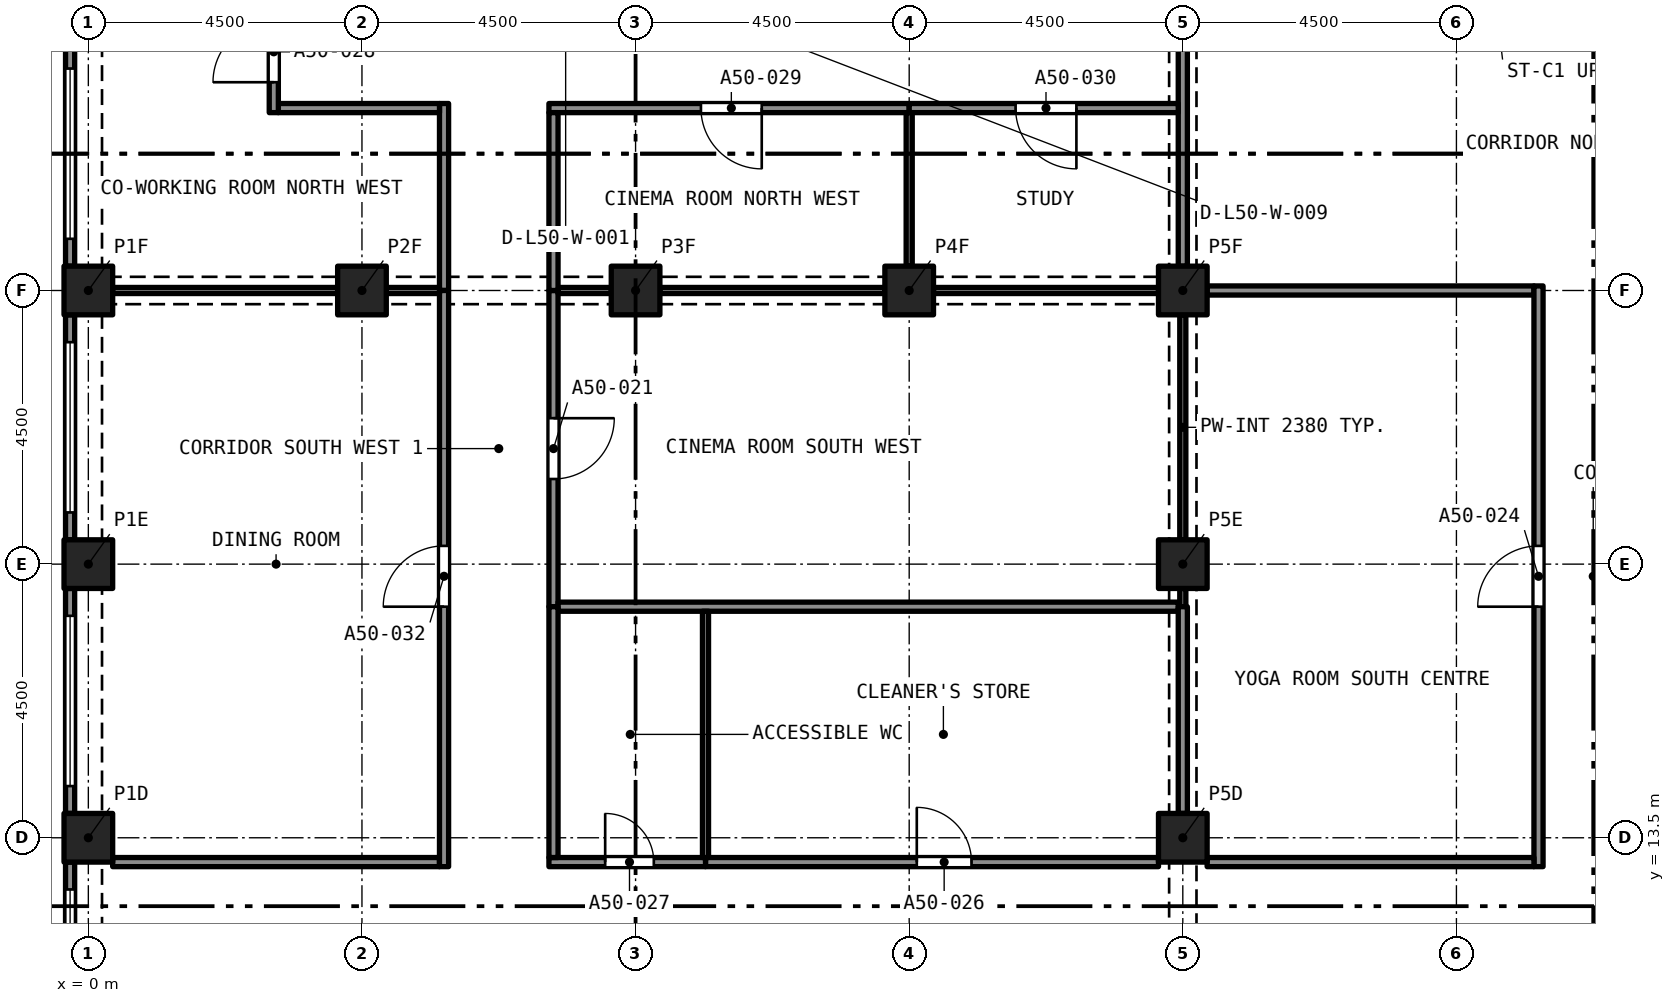
"""IFC4 building model, lengths in metres.
Left out: names, types, materials, properties, quantities, classifications, styles, units other than length and angle.
Written with IfcOpenShell. Run it as: python <this file> out.ifc"""

import sys

from ifc_helpers import new_model, si_unit, direction, frame, frame_2d, origin, origin_2d, place, context, subcontext, project, spatial, rectangle, extrude, element, fill, save


model = new_model("IFC4")
c1 = context("Model", 3, precision=1e-05, world=origin(), true_north=direction((0.0, 1.0)))
c2 = subcontext(c1, "Body", "Model", "MODEL_VIEW")
j1 = project(units=[si_unit("LENGTHUNIT", "METRE"), si_unit("PLANEANGLEUNIT", "RADIAN")], contexts=[c1])
p1 = place(None, origin())
s1 = spatial("IfcSite", under=j1, at=p1, CompositionType="ELEMENT")
p2 = place(p1, origin())
s2 = spatial("IfcBuilding", under=s1, at=p2, CompositionType="ELEMENT")
p3 = place(p2, frame((0.0, 0.0, 182.7)))
s3 = spatial("IfcBuildingStorey", under=s2, at=p3, CompositionType="ELEMENT", Elevation=182.7)
for number, where, z_axis, x_axis in (
    (1, (0.0, 13.5, 0.0), (0.0, 0.0, 1.0), (1.0, 0.0, 0.0)),
    (2, (18.0, 13.5, 0.0), (0.0, 0.0, 1.0), (1.0, 0.0, 0.0)),
    (3, (0.0, 18.0, 0.0), (0.0, 0.0, 1.0), (1.0, 0.0, 0.0)),
    (4, (18.0, 18.0, 0.0), (0.0, 0.0, 1.0), (1.0, 0.0, 0.0)),
    (5, (0.0, 22.5, 0.0), (0.0, 0.0, 1.0), (1.0, 0.0, 0.0)),
    (6, (4.5, 22.5, 0.0), (0.0, 0.0, 1.0), (1.0, 0.0, 0.0)),
    (7, (9.0, 22.5, 0.0), (0.0, 0.0, 1.0), (1.0, 0.0, 0.0)),
    (8, (13.5, 22.5, 0.0), (0.0, 0.0, 1.0), (1.0, 0.0, 0.0)),
    (9, (18.0, 22.5, 0.0), (0.0, 0.0, 1.0), (1.0, 0.0, 0.0)),
):
    element("IfcColumn", number, at=place(p3, frame(where, z_axis=z_axis, x_axis=x_axis)), inside=s3, PredefinedType="COLUMN", context=c2, shape_type="SweptSolid", body=[
        extrude(rectangle(XDim=0.8, YDim=0.8, at=origin_2d()), origin(), (0.0, 0.0, 1.0), 3.2),
    ])
p4 = place(p3, frame((-0.3, 22.9, 0.0), z_axis=(0.0, 0.0, 1.0), x_axis=(0.0, 1.0, 0.0)))
e10 = element("IfcWall", 10, at=p4, inside=s3, PredefinedType="SOLIDWALL", context=c2, shape_type="SweptSolid", body=[
    extrude(rectangle(XDim=3.7, YDim=0.15, at=frame_2d((1.85, 0.0))), origin(), (0.0, 0.0, 1.0), 3.2),
])
p5 = place(p4, frame((0.45, 0.0, 0.45)))
e11 = element("IfcOpeningElement", 11, at=p5, cuts=e10, PredefinedType="OPENING", context=c2, shape_type="SweptSolid", body=[
    extrude(rectangle(XDim=2.8, YDim=1.95, at=frame_2d((1.4, 0.975))), frame((0.0, 0.085, 0.0), z_axis=(0.0, -1.0, 0.0), x_axis=(1.0, 0.0, 0.0)), (0.0, 0.0, 1.0), 0.17),
])
p6 = place(p3, frame((-0.3, 18.4, 0.0), z_axis=(0.0, 0.0, 1.0), x_axis=(0.0, 1.0, 0.0)))
e12 = element("IfcWall", 12, at=p6, inside=s3, PredefinedType="SOLIDWALL", context=c2, shape_type="SweptSolid", body=[
    extrude(rectangle(XDim=3.7, YDim=0.15, at=frame_2d((1.85, 0.0))), origin(), (0.0, 0.0, 1.0), 3.2),
])
p7 = place(p6, frame((0.45, 0.0, 0.45)))
e13 = element("IfcOpeningElement", 13, at=p7, cuts=e12, PredefinedType="OPENING", context=c2, shape_type="SweptSolid", body=[
    extrude(rectangle(XDim=2.8, YDim=1.95, at=frame_2d((1.4, 0.975))), frame((0.0, 0.085, 0.0), z_axis=(0.0, -1.0, 0.0), x_axis=(1.0, 0.0, 0.0)), (0.0, 0.0, 1.0), 0.17),
])
p8 = place(p3, frame((-0.3, 13.9, 0.0), z_axis=(0.0, 0.0, 1.0), x_axis=(0.0, 1.0, 0.0)))
e14 = element("IfcWall", 14, at=p8, inside=s3, PredefinedType="SOLIDWALL", context=c2, shape_type="SweptSolid", body=[
    extrude(rectangle(XDim=3.7, YDim=0.15, at=frame_2d((1.85, 0.0))), origin(), (0.0, 0.0, 1.0), 3.2),
])
p9 = place(p8, frame((0.45, 0.0, 0.45)))
e15 = element("IfcOpeningElement", 15, at=p9, cuts=e14, PredefinedType="OPENING", context=c2, shape_type="SweptSolid", body=[
    extrude(rectangle(XDim=2.8, YDim=1.95, at=frame_2d((1.4, 0.975))), frame((0.0, 0.085, 0.0), z_axis=(0.0, -1.0, 0.0), x_axis=(1.0, 0.0, 0.0)), (0.0, 0.0, 1.0), 0.17),
])
p10 = place(p3, frame((-0.3, 9.4, 0.0), z_axis=(0.0, 0.0, 1.0), x_axis=(0.0, 1.0, 0.0)))
e16 = element("IfcWall", 16, at=p10, inside=s3, PredefinedType="SOLIDWALL", context=c2, shape_type="SweptSolid", body=[
    extrude(rectangle(XDim=3.7, YDim=0.15, at=frame_2d((1.85, 0.0))), origin(), (0.0, 0.0, 1.0), 3.2),
])
p11 = place(p10, frame((0.45, 0.0, 0.45)))
e17 = element("IfcOpeningElement", 17, at=p11, cuts=e16, PredefinedType="OPENING", context=c2, shape_type="SweptSolid", body=[
    extrude(rectangle(XDim=2.8, YDim=1.95, at=frame_2d((1.4, 0.975))), frame((0.0, 0.085, 0.0), z_axis=(0.0, -1.0, 0.0), x_axis=(1.0, 0.0, 0.0)), (0.0, 0.0, 1.0), 0.17),
])
p12 = place(p3, frame((18.0, 18.4, 0.0), z_axis=(0.0, 0.0, 1.0), x_axis=(0.0, 1.0, 0.0)))
e18 = element("IfcWall", 18, at=p12, inside=s3, PredefinedType="PARTITIONING", context=c2, shape_type="SweptSolid", body=[
    extrude(rectangle(XDim=3.7, YDim=0.1, at=frame_2d((1.85, 0.0))), origin(), (0.0, 0.0, 1.0), 2.38),
])
p13 = place(p3, frame((18.0, 17.3, 0.0), z_axis=(0.0, 0.0, 1.0), x_axis=(0.0, 1.0, 0.0)))
e19 = element("IfcWall", 19, at=p13, inside=s3, PredefinedType="PARTITIONING", context=c2, shape_type="SweptSolid", body=[
    extrude(rectangle(XDim=0.3, YDim=0.1, at=frame_2d((0.15, 0.0))), origin(), (0.0, 0.0, 1.0), 2.75),
])
p14 = place(p3, frame((7.65, 22.5, 0.0), z_axis=(0.0, 0.0, 1.0), x_axis=(0.0, -1.0, 0.0)))
e20 = element("IfcWall", 20, at=p14, inside=s3, PredefinedType="PARTITIONING", context=c2, shape_type="SweptSolid", body=[
    extrude(rectangle(XDim=5.2, YDim=0.15, at=frame_2d((2.6, 0.0))), origin(), (0.0, 0.0, 1.0), 2.9),
])
p15 = place(p14, frame((2.1, 0.0, 0.0)))
e21 = element("IfcOpeningElement", 21, at=p15, cuts=e20, PredefinedType="OPENING", context=c2, shape_type="SweptSolid", body=[
    extrude(rectangle(XDim=1.0, YDim=2.1, at=frame_2d((0.5, 1.05))), frame((0.0, 0.085, 0.0), z_axis=(0.0, -1.0, 0.0), x_axis=(1.0, 0.0, 0.0)), (0.0, 0.0, 1.0), 0.17),
])
p16 = place(p3, frame((7.725, 22.5, 0.0), z_axis=(0.0, 0.0, 1.0), x_axis=(1.0, 0.0, 0.0)))
e22 = element("IfcWall", 22, at=p16, inside=s3, PredefinedType="PARTITIONING", context=c2, shape_type="SweptSolid", body=[
    extrude(rectangle(XDim=0.875, YDim=0.1, at=frame_2d((0.438, 0.0))), origin(), (0.0, 0.0, 1.0), 2.38),
])
for number, where, z_axis, x_axis in (
    (23, (9.4, 22.5, 0.0), (0.0, 0.0, 1.0), (1.0, 0.0, 0.0)),
    (24, (13.9, 22.5, 0.0), (0.0, 0.0, 1.0), (1.0, 0.0, 0.0)),
):
    element("IfcWall", number, at=place(p3, frame(where, z_axis=z_axis, x_axis=x_axis)), inside=s3, PredefinedType="PARTITIONING", context=c2, shape_type="SweptSolid", body=[
        extrude(rectangle(XDim=3.7, YDim=0.1, at=frame_2d((1.85, 0.0))), origin(), (0.0, 0.0, 1.0), 2.38),
    ])
p17 = place(p3, frame((7.725, 17.3, 0.0), z_axis=(0.0, 0.0, 1.0), x_axis=(1.0, 0.0, 0.0)))
e25 = element("IfcWall", 25, at=p17, inside=s3, PredefinedType="PARTITIONING", context=c2, shape_type="SweptSolid", body=[
    extrude(rectangle(XDim=10.2, YDim=0.15, at=frame_2d((5.1, 0.0))), origin(), (0.0, 0.0, 1.0), 2.9),
])
p18 = place(p3, frame((18.4, 22.5, 0.0), z_axis=(0.0, 0.0, 1.0), x_axis=(1.0, 0.0, 0.0)))
e26 = element("IfcWall", 26, at=p18, inside=s3, PredefinedType="PARTITIONING", context=c2, shape_type="SweptSolid", body=[
    extrude(rectangle(XDim=5.375, YDim=0.15, at=frame_2d((2.688, 0.0))), origin(), (0.0, 0.0, 1.0), 2.75),
])
p19 = place(p3, frame((18.0, 22.9, 0.0), z_axis=(0.0, 0.0, 1.0), x_axis=(0.0, 1.0, 0.0)))
e27 = element("IfcWall", 27, at=p19, inside=s3, PredefinedType="PARTITIONING", context=c2, shape_type="SweptSolid", body=[
    extrude(rectangle(XDim=3.7, YDim=0.15, at=frame_2d((1.85, 0.0))), origin(), (0.0, 0.0, 1.0), 2.38),
])
p20 = place(p3, frame((23.85, 13.025, 0.0), z_axis=(0.0, 0.0, 1.0), x_axis=(0.0, 1.0, 0.0)))
e28 = element("IfcWall", 28, at=p20, inside=s3, PredefinedType="PARTITIONING", context=c2, shape_type="SweptSolid", body=[
    extrude(rectangle(XDim=9.55, YDim=0.15, at=frame_2d((4.775, 0.0))), origin(), (0.0, 0.0, 1.0), 2.75),
])
p21 = place(p20, frame((4.275, 0.0, 0.0)))
e29 = element("IfcOpeningElement", 29, at=p21, cuts=e28, PredefinedType="OPENING", context=c2, shape_type="SweptSolid", body=[
    extrude(rectangle(XDim=1.0, YDim=2.1, at=frame_2d((0.5, 1.05))), frame((0.0, 0.085, 0.0), z_axis=(0.0, -1.0, 0.0), x_axis=(1.0, 0.0, 0.0)), (0.0, 0.0, 1.0), 0.17),
])
p22 = place(p3, frame((18.4, 13.1, 0.0), z_axis=(0.0, 0.0, 1.0), x_axis=(1.0, 0.0, 0.0)))
e30 = element("IfcWall", 30, at=p22, inside=s3, PredefinedType="PARTITIONING", context=c2, shape_type="SweptSolid", body=[
    extrude(rectangle(XDim=5.375, YDim=0.15, at=frame_2d((2.688, 0.0))), origin(), (0.0, 0.0, 1.0), 2.75),
])
p23 = place(p3, frame((10.15, 13.1, 0.0), z_axis=(0.0, 0.0, 1.0), x_axis=(1.0, 0.0, 0.0)))
e31 = element("IfcWall", 31, at=p23, inside=s3, PredefinedType="PARTITIONING", context=c2, shape_type="SweptSolid", body=[
    extrude(rectangle(XDim=7.45, YDim=0.15, at=frame_2d((3.725, 0.0))), origin(), (0.0, 0.0, 1.0), 2.9),
])
p24 = place(p23, frame((3.475, 0.0, 0.0)))
e32 = element("IfcOpeningElement", 32, at=p24, cuts=e31, PredefinedType="OPENING", context=c2, shape_type="SweptSolid", body=[
    extrude(rectangle(XDim=0.9, YDim=2.1, at=frame_2d((0.45, 1.05))), frame((0.0, 0.085, 0.0), z_axis=(0.0, -1.0, 0.0), x_axis=(1.0, 0.0, 0.0)), (0.0, 0.0, 1.0), 0.17),
])
p25 = place(p3, frame((7.575, 13.1, 0.0), z_axis=(0.0, 0.0, 1.0), x_axis=(1.0, 0.0, 0.0)))
e33 = element("IfcWall", 33, at=p25, inside=s3, PredefinedType="PARTITIONING", context=c2, shape_type="SweptSolid", body=[
    extrude(rectangle(XDim=2.575, YDim=0.15, at=frame_2d((1.288, 0.0))), origin(), (0.0, 0.0, 1.0), 2.9),
])
p26 = place(p25, frame((0.925, 0.0, 0.0)))
e34 = element("IfcOpeningElement", 34, at=p26, cuts=e33, PredefinedType="OPENING", context=c2, shape_type="SweptSolid", body=[
    extrude(rectangle(XDim=0.8, YDim=2.1, at=frame_2d((0.4, 1.05))), frame((0.0, 0.085, 0.0), z_axis=(0.0, -1.0, 0.0), x_axis=(1.0, 0.0, 0.0)), (0.0, 0.0, 1.0), 0.17),
])
p27 = place(p3, frame((0.4, 13.1, 0.0), z_axis=(0.0, 0.0, 1.0), x_axis=(1.0, 0.0, 0.0)))
e35 = element("IfcWall", 35, at=p27, inside=s3, PredefinedType="PARTITIONING", context=c2, shape_type="SweptSolid", body=[
    extrude(rectangle(XDim=5.375, YDim=0.15, at=frame_2d((2.688, 0.0))), origin(), (0.0, 0.0, 1.0), 2.9),
])
p28 = place(p3, frame((18.0, 13.9, 0.0), z_axis=(0.0, 0.0, 1.0), x_axis=(0.0, 1.0, 0.0)))
e36 = element("IfcWall", 36, at=p28, inside=s3, PredefinedType="PARTITIONING", context=c2, shape_type="SweptSolid", body=[
    extrude(rectangle(XDim=3.4, YDim=0.15, at=frame_2d((1.7, 0.0))), origin(), (0.0, 0.0, 1.0), 2.38),
])
p29 = place(p3, frame((5.85, 22.5, 0.0), z_axis=(0.0, 0.0, 1.0), x_axis=(0.0, 1.0, 0.0)))
e37 = element("IfcWall", 37, at=p29, inside=s3, PredefinedType="PARTITIONING", context=c2, shape_type="SweptSolid", body=[
    extrude(rectangle(XDim=3.075, YDim=0.15, at=frame_2d((1.538, 0.0))), origin(), (0.0, 0.0, 1.0), 2.9),
])
p30 = place(p3, frame((3.125, 25.5, 0.0), z_axis=(0.0, 0.0, 1.0), x_axis=(1.0, 0.0, 0.0)))
e38 = element("IfcWall", 38, at=p30, inside=s3, PredefinedType="PARTITIONING", context=c2, shape_type="SweptSolid", body=[
    extrude(rectangle(XDim=2.65, YDim=0.15, at=frame_2d((1.325, 0.0))), origin(), (0.0, 0.0, 1.0), 2.9),
])
p31 = place(p3, frame((3.05, 25.425, 0.0), z_axis=(0.0, 0.0, 1.0), x_axis=(0.0, 1.0, 0.0)))
e39 = element("IfcWall", 39, at=p31, inside=s3, PredefinedType="PARTITIONING", context=c2, shape_type="SweptSolid", body=[
    extrude(rectangle(XDim=1.925, YDim=0.15, at=frame_2d((0.962, 0.0))), origin(), (0.0, 0.0, 1.0), 2.9),
])
p32 = place(p31, frame((0.5, 0.0, 0.0)))
e40 = element("IfcOpeningElement", 40, at=p32, cuts=e39, PredefinedType="OPENING", context=c2, shape_type="SweptSolid", body=[
    extrude(rectangle(XDim=1.0, YDim=2.1, at=frame_2d((0.5, 1.05))), frame((0.0, 0.085, 0.0), z_axis=(0.0, -1.0, 0.0), x_axis=(1.0, 0.0, 0.0)), (0.0, 0.0, 1.0), 0.17),
])
p33 = place(p3, frame((13.5, 25.5, 0.0), z_axis=(0.0, 0.0, 1.0), x_axis=(-1.0, 0.0, 0.0)))
e41 = element("IfcWall", 41, at=p33, inside=s3, PredefinedType="PARTITIONING", context=c2, shape_type="SweptSolid", body=[
    extrude(rectangle(XDim=5.925, YDim=0.15, at=frame_2d((2.962, 0.0))), origin(), (0.0, 0.0, 1.0), 2.9),
])
p34 = place(p33, frame((2.425, 0.0, 0.0)))
e42 = element("IfcOpeningElement", 42, at=p34, cuts=e41, PredefinedType="OPENING", context=c2, shape_type="SweptSolid", body=[
    extrude(rectangle(XDim=1.0, YDim=2.1, at=frame_2d((0.5, 1.05))), frame((0.0, 0.085, 0.0), z_axis=(0.0, -1.0, 0.0), x_axis=(1.0, 0.0, 0.0)), (0.0, 0.0, 1.0), 0.17),
])
p35 = place(p3, frame((7.65, 22.5, 0.0), z_axis=(0.0, 0.0, 1.0), x_axis=(0.0, 1.0, 0.0)))
e43 = element("IfcWall", 43, at=p35, inside=s3, PredefinedType="PARTITIONING", context=c2, shape_type="SweptSolid", body=[
    extrude(rectangle(XDim=2.925, YDim=0.15, at=frame_2d((1.462, 0.0))), origin(), (0.0, 0.0, 1.0), 2.9),
])
p36 = place(p3, frame((17.925, 25.5, 0.0), z_axis=(0.0, 0.0, 1.0), x_axis=(-1.0, 0.0, 0.0)))
e44 = element("IfcWall", 44, at=p36, inside=s3, PredefinedType="PARTITIONING", context=c2, shape_type="SweptSolid", body=[
    extrude(rectangle(XDim=4.425, YDim=0.15, at=frame_2d((2.212, 0.0))), origin(), (0.0, 0.0, 1.0), 2.9),
])
p37 = place(p36, frame((1.675, 0.0, 0.0)))
e45 = element("IfcOpeningElement", 45, at=p37, cuts=e44, PredefinedType="OPENING", context=c2, shape_type="SweptSolid", body=[
    extrude(rectangle(XDim=1.0, YDim=2.1, at=frame_2d((0.5, 1.05))), frame((0.0, 0.085, 0.0), z_axis=(0.0, -1.0, 0.0), x_axis=(1.0, 0.0, 0.0)), (0.0, 0.0, 1.0), 0.17),
])
p38 = place(p3, frame((7.65, 13.175, 0.0), z_axis=(0.0, 0.0, 1.0), x_axis=(0.0, 1.0, 0.0)))
e46 = element("IfcWall", 46, at=p38, inside=s3, PredefinedType="PARTITIONING", context=c2, shape_type="SweptSolid", body=[
    extrude(rectangle(XDim=4.125, YDim=0.15, at=frame_2d((2.062, 0.0))), origin(), (0.0, 0.0, 1.0), 2.9),
])
p39 = place(p3, frame((5.85, 13.025, 0.0), z_axis=(0.0, 0.0, 1.0), x_axis=(0.0, 1.0, 0.0)))
e47 = element("IfcWall", 47, at=p39, inside=s3, PredefinedType="PARTITIONING", context=c2, shape_type="SweptSolid", body=[
    extrude(rectangle(XDim=9.475, YDim=0.15, at=frame_2d((4.738, 0.0))), origin(), (0.0, 0.0, 1.0), 2.9),
])
p40 = place(p39, frame((4.275, 0.0, 0.0)))
e48 = element("IfcOpeningElement", 48, at=p40, cuts=e47, PredefinedType="OPENING", context=c2, shape_type="SweptSolid", body=[
    extrude(rectangle(XDim=1.0, YDim=2.1, at=frame_2d((0.5, 1.05))), frame((0.0, 0.085, 0.0), z_axis=(0.0, -1.0, 0.0), x_axis=(1.0, 0.0, 0.0)), (0.0, 0.0, 1.0), 0.17),
])
p41 = place(p3, frame((4.9, 22.5, 0.0), z_axis=(0.0, 0.0, 1.0), x_axis=(1.0, 0.0, 0.0)))
e49 = element("IfcWall", 49, at=p41, inside=s3, PredefinedType="PARTITIONING", context=c2, shape_type="SweptSolid", body=[
    extrude(rectangle(XDim=0.875, YDim=0.1, at=frame_2d((0.438, 0.0))), origin(), (0.0, 0.0, 1.0), 2.38),
])
p42 = place(p3, frame((0.4, 22.5, 0.0), z_axis=(0.0, 0.0, 1.0), x_axis=(1.0, 0.0, 0.0)))
e50 = element("IfcWall", 50, at=p42, inside=s3, PredefinedType="PARTITIONING", context=c2, shape_type="SweptSolid", body=[
    extrude(rectangle(XDim=3.7, YDim=0.1, at=frame_2d((1.85, 0.0))), origin(), (0.0, 0.0, 1.0), 2.38),
])
p43 = place(p3, frame((13.5, 22.9, 0.0), z_axis=(0.0, 0.0, 1.0), x_axis=(0.0, 1.0, 0.0)))
e51 = element("IfcWall", 51, at=p43, inside=s3, PredefinedType="PARTITIONING", context=c2, shape_type="SweptSolid", body=[
    extrude(rectangle(XDim=2.525, YDim=0.1, at=frame_2d((1.263, 0.0))), origin(), (0.0, 0.0, 1.0), 2.9),
])
p44 = place(p3, frame((10.15, 13.175, 0.0), z_axis=(0.0, 0.0, 1.0), x_axis=(0.0, 1.0, 0.0)))
e52 = element("IfcWall", 52, at=p44, inside=s3, PredefinedType="PARTITIONING", context=c2, shape_type="SweptSolid", body=[
    extrude(rectangle(XDim=4.05, YDim=0.1, at=frame_2d((2.025, 0.0))), origin(), (0.0, 0.0, 1.0), 2.9),
])
p45 = place(p5, origin())
e53 = element("IfcWindow", 53, at=p45, inside=s3, PartitioningType="SINGLE_PANEL", PredefinedType="WINDOW", context=c2, shape_type="SweptSolid", body=[
    extrude(rectangle(XDim=2.8, YDim=1.95, at=frame_2d((1.4, 0.975))), frame((0.0, 0.03, 0.0), z_axis=(0.0, -1.0, 0.0), x_axis=(1.0, 0.0, 0.0)), (0.0, 0.0, 1.0), 0.06),
])
fill(e11, e53)
p46 = place(p7, origin())
e54 = element("IfcWindow", 54, at=p46, inside=s3, PartitioningType="SINGLE_PANEL", PredefinedType="WINDOW", context=c2, shape_type="SweptSolid", body=[
    extrude(rectangle(XDim=2.8, YDim=1.95, at=frame_2d((1.4, 0.975))), frame((0.0, 0.03, 0.0), z_axis=(0.0, -1.0, 0.0), x_axis=(1.0, 0.0, 0.0)), (0.0, 0.0, 1.0), 0.06),
])
fill(e13, e54)
p47 = place(p9, origin())
e55 = element("IfcWindow", 55, at=p47, inside=s3, PartitioningType="SINGLE_PANEL", PredefinedType="WINDOW", context=c2, shape_type="SweptSolid", body=[
    extrude(rectangle(XDim=2.8, YDim=1.95, at=frame_2d((1.4, 0.975))), frame((0.0, 0.03, 0.0), z_axis=(0.0, -1.0, 0.0), x_axis=(1.0, 0.0, 0.0)), (0.0, 0.0, 1.0), 0.06),
])
fill(e15, e55)
p48 = place(p11, origin())
e56 = element("IfcWindow", 56, at=p48, inside=s3, PartitioningType="SINGLE_PANEL", PredefinedType="WINDOW", context=c2, shape_type="SweptSolid", body=[
    extrude(rectangle(XDim=2.8, YDim=1.95, at=frame_2d((1.4, 0.975))), frame((0.0, 0.03, 0.0), z_axis=(0.0, -1.0, 0.0), x_axis=(1.0, 0.0, 0.0)), (0.0, 0.0, 1.0), 0.06),
])
fill(e17, e56)
p49 = place(p15, origin())
e57 = element("IfcDoor", 57, at=p49, inside=s3, OperationType="SINGLE_SWING_RIGHT", PredefinedType="DOOR", context=c2, shape_type="SweptSolid", body=[
    extrude(rectangle(XDim=1.0, YDim=2.1, at=frame_2d((0.5, 1.05))), frame((0.0, 0.025, 0.0), z_axis=(0.0, -1.0, 0.0), x_axis=(1.0, 0.0, 0.0)), (0.0, 0.0, 1.0), 0.05),
])
fill(e21, e57)
p50 = place(p21, origin())
e58 = element("IfcDoor", 58, at=p50, inside=s3, OperationType="SINGLE_SWING_RIGHT", PredefinedType="DOOR", context=c2, shape_type="SweptSolid", body=[
    extrude(rectangle(XDim=1.0, YDim=2.1, at=frame_2d((0.5, 1.05))), frame((0.0, 0.025, 0.0), z_axis=(0.0, -1.0, 0.0), x_axis=(1.0, 0.0, 0.0)), (0.0, 0.0, 1.0), 0.05),
])
fill(e29, e58)
p51 = place(p24, origin())
e59 = element("IfcDoor", 59, at=p51, inside=s3, OperationType="SINGLE_SWING_RIGHT", PredefinedType="DOOR", context=c2, shape_type="SweptSolid", body=[
    extrude(rectangle(XDim=0.9, YDim=2.1, at=frame_2d((0.45, 1.05))), frame((0.0, 0.025, 0.0), z_axis=(0.0, -1.0, 0.0), x_axis=(1.0, 0.0, 0.0)), (0.0, 0.0, 1.0), 0.05),
])
fill(e32, e59)
p52 = place(p26, origin())
e60 = element("IfcDoor", 60, at=p52, inside=s3, OperationType="SINGLE_SWING_RIGHT", PredefinedType="DOOR", context=c2, shape_type="SweptSolid", body=[
    extrude(rectangle(XDim=0.8, YDim=2.1, at=frame_2d((0.4, 1.05))), frame((0.0, 0.025, 0.0), z_axis=(0.0, -1.0, 0.0), x_axis=(1.0, 0.0, 0.0)), (0.0, 0.0, 1.0), 0.05),
])
fill(e34, e60)
p53 = place(p32, origin())
e61 = element("IfcDoor", 61, at=p53, inside=s3, OperationType="SINGLE_SWING_RIGHT", PredefinedType="DOOR", context=c2, shape_type="SweptSolid", body=[
    extrude(rectangle(XDim=1.0, YDim=2.1, at=frame_2d((0.5, 1.05))), frame((0.0, 0.025, 0.0), z_axis=(0.0, -1.0, 0.0), x_axis=(1.0, 0.0, 0.0)), (0.0, 0.0, 1.0), 0.05),
])
fill(e40, e61)
p54 = place(p34, origin())
e62 = element("IfcDoor", 62, at=p54, inside=s3, OperationType="SINGLE_SWING_LEFT", PredefinedType="DOOR", context=c2, shape_type="SweptSolid", body=[
    extrude(rectangle(XDim=1.0, YDim=2.1, at=frame_2d((0.5, 1.05))), frame((0.0, 0.025, 0.0), z_axis=(0.0, -1.0, 0.0), x_axis=(1.0, 0.0, 0.0)), (0.0, 0.0, 1.0), 0.05),
])
fill(e42, e62)
p55 = place(p37, origin())
e63 = element("IfcDoor", 63, at=p55, inside=s3, OperationType="SINGLE_SWING_LEFT", PredefinedType="DOOR", context=c2, shape_type="SweptSolid", body=[
    extrude(rectangle(XDim=1.0, YDim=2.1, at=frame_2d((0.5, 1.05))), frame((0.0, 0.025, 0.0), z_axis=(0.0, -1.0, 0.0), x_axis=(1.0, 0.0, 0.0)), (0.0, 0.0, 1.0), 0.05),
])
fill(e45, e63)
p56 = place(p40, origin())
e64 = element("IfcDoor", 64, at=p56, inside=s3, OperationType="SINGLE_SWING_RIGHT", PredefinedType="DOOR", context=c2, shape_type="SweptSolid", body=[
    extrude(rectangle(XDim=1.0, YDim=2.1, at=frame_2d((0.5, 1.05))), frame((0.0, 0.025, 0.0), z_axis=(0.0, -1.0, 0.0), x_axis=(1.0, 0.0, 0.0)), (0.0, 0.0, 1.0), 0.05),
])
fill(e48, e64)
save(model, sys.argv[1])
